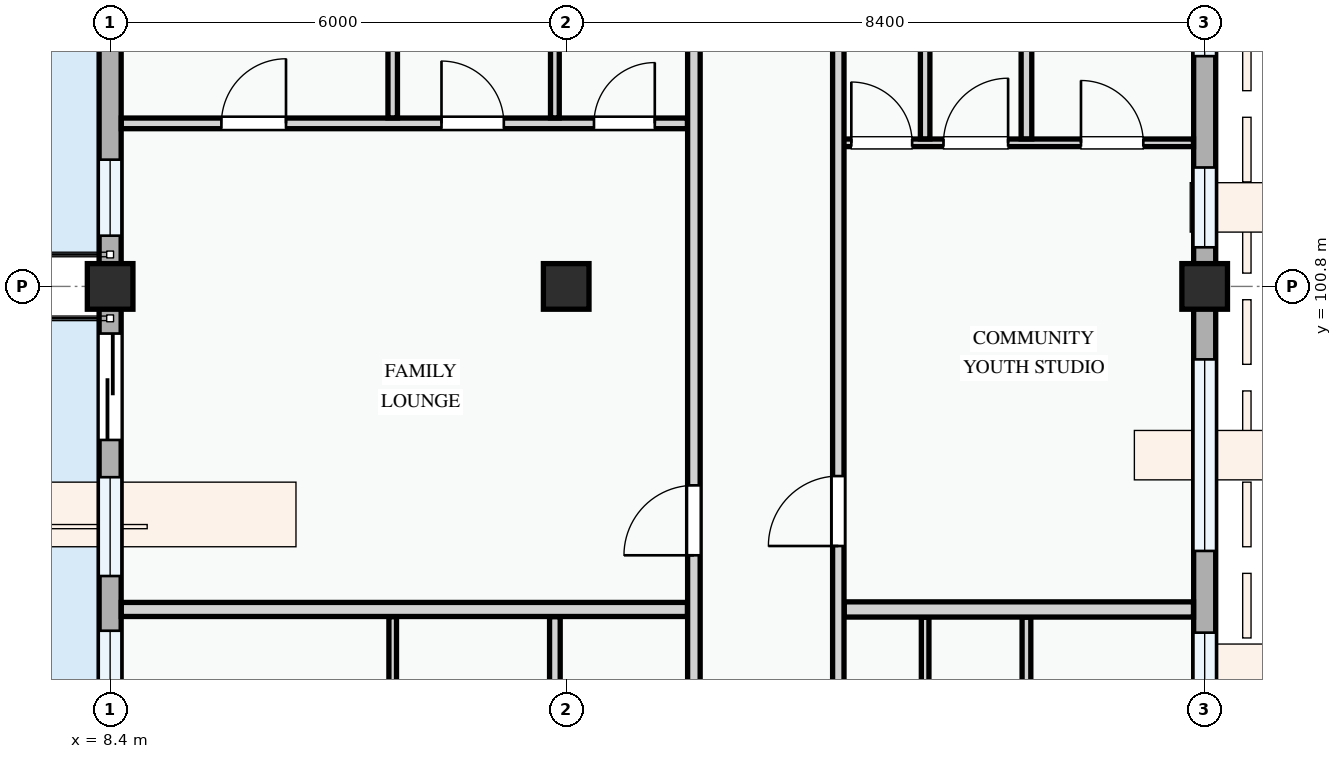
"""IFC4 building model, lengths in metres.
Left out: names, types, materials, properties, quantities, classifications, styles, units other than length and angle.
Written with IfcOpenShell. Run it as: python <this file> out.ifc"""

import sys

from ifc_helpers import new_model, si_unit, direction, frame, frame_2d, origin, origin_2d, place, context, subcontext, project, spatial, rectangle, extrude, element, fill, save


model = new_model("IFC4")
c1 = context("Model", 3, precision=1e-05, world=origin(), true_north=direction((0.0, 1.0)))
c2 = subcontext(c1, "Body", "Model", "MODEL_VIEW")
j1 = project(units=[si_unit("LENGTHUNIT", "METRE"), si_unit("PLANEANGLEUNIT", "RADIAN")], contexts=[c1])
p1 = place(None, origin())
s1 = spatial("IfcSite", under=j1, at=p1, CompositionType="ELEMENT")
p2 = place(p1, origin())
s2 = spatial("IfcBuilding", under=s1, at=p2, CompositionType="ELEMENT")
p3 = place(p2, frame((0.0, 0.0, 27.9)))
s3 = spatial("IfcBuildingStorey", under=s2, at=p3, CompositionType="ELEMENT", Elevation=27.9)
for number, where, z_axis, x_axis in (
    (1, (8.4, 100.8, 0.0), (0.0, 0.0, 1.0), (1.0, 0.0, 0.0)),
    (2, (14.4, 100.8, 0.0), (0.0, 0.0, 1.0), (1.0, 0.0, 0.0)),
    (3, (22.8, 100.8, 0.0), (0.0, 0.0, 1.0), (1.0, 0.0, 0.0)),
):
    element("IfcColumn", number, at=place(p3, frame(where, z_axis=z_axis, x_axis=x_axis)), inside=s3, PredefinedType="COLUMN", context=c2, shape_type="SweptSolid", body=[
        extrude(rectangle(XDim=0.6, YDim=0.6, at=origin_2d()), origin(), (0.0, 0.0, 1.0), 3.3),
    ])
p4 = place(p3, frame((8.4, 109.2, 0.0), z_axis=(0.0, 0.0, 1.0), x_axis=(0.0, -1.0, 0.0)))
e4 = element("IfcWall", 4, at=p4, inside=s3, PredefinedType="STANDARD", context=c2, shape_type="SweptSolid", body=[
    extrude(rectangle(XDim=8.4, YDim=0.29, at=frame_2d((4.2, 0.0))), origin(), (0.0, 0.0, 1.0), 2.345),
])
p5 = place(p4, frame((0.62, 0.0, 0.0)))
e5 = element("IfcOpeningElement", 5, at=p5, cuts=e4, PredefinedType="OPENING", context=c2, shape_type="SweptSolid", body=[
    extrude(rectangle(XDim=1.3, YDim=2.15, at=frame_2d((0.65, 1.075))), frame((0.0, 0.155, 0.0), z_axis=(0.0, -1.0, 0.0), x_axis=(1.0, 0.0, 0.0)), (0.0, 0.0, 1.0), 0.31),
])
p6 = place(p4, frame((3.587, 0.0, 0.78)))
e6 = element("IfcOpeningElement", 6, at=p6, cuts=e4, PredefinedType="OPENING", context=c2, shape_type="SweptSolid", body=[
    extrude(rectangle(XDim=1.05, YDim=1.2, at=frame_2d((0.525, 0.6))), frame((0.0, 0.155, 0.0), z_axis=(0.0, -1.0, 0.0), x_axis=(1.0, 0.0, 0.0)), (0.0, 0.0, 1.0), 0.31),
])
p7 = place(p4, frame((6.732, 0.0, 0.78)))
e7 = element("IfcOpeningElement", 7, at=p7, cuts=e4, PredefinedType="OPENING", context=c2, shape_type="SweptSolid", body=[
    extrude(rectangle(XDim=1.0, YDim=1.25, at=frame_2d((0.5, 0.625))), frame((0.0, 0.155, 0.0), z_axis=(0.0, -1.0, 0.0), x_axis=(1.0, 0.0, 0.0)), (0.0, 0.0, 1.0), 0.31),
])
p8 = place(p3, frame((8.4, 100.8, 0.0), z_axis=(0.0, 0.0, 1.0), x_axis=(0.0, -1.0, 0.0)))
e8 = element("IfcWall", 8, at=p8, inside=s3, PredefinedType="STANDARD", context=c2, shape_type="SweptSolid", body=[
    extrude(rectangle(XDim=6.0, YDim=0.29, at=frame_2d((3.0, 0.0))), origin(), (0.0, 0.0, 1.0), 2.445),
])
p9 = place(p8, frame((0.62, 0.0, 0.0)))
e9 = element("IfcOpeningElement", 9, at=p9, cuts=e8, PredefinedType="OPENING", context=c2, shape_type="SweptSolid", body=[
    extrude(rectangle(XDim=1.4, YDim=2.2, at=frame_2d((0.7, 1.1))), frame((0.0, 0.155, 0.0), z_axis=(0.0, -1.0, 0.0), x_axis=(1.0, 0.0, 0.0)), (0.0, 0.0, 1.0), 0.31),
])
p10 = place(p8, frame((2.51, 0.0, 0.78)))
e10 = element("IfcOpeningElement", 10, at=p10, cuts=e8, PredefinedType="OPENING", context=c2, shape_type="SweptSolid", body=[
    extrude(rectangle(XDim=1.3, YDim=1.4, at=frame_2d((0.65, 0.7))), frame((0.0, 0.155, 0.0), z_axis=(0.0, -1.0, 0.0), x_axis=(1.0, 0.0, 0.0)), (0.0, 0.0, 1.0), 0.31),
])
p11 = place(p8, frame((4.53, 0.0, 0.78)))
e11 = element("IfcOpeningElement", 11, at=p11, cuts=e8, PredefinedType="OPENING", context=c2, shape_type="SweptSolid", body=[
    extrude(rectangle(XDim=1.0, YDim=1.25, at=frame_2d((0.5, 0.625))), frame((0.0, 0.155, 0.0), z_axis=(0.0, -1.0, 0.0), x_axis=(1.0, 0.0, 0.0)), (0.0, 0.0, 1.0), 0.31),
])
p12 = place(p3, frame((22.8, 94.8, 0.0), z_axis=(0.0, 0.0, 1.0), x_axis=(0.0, 1.0, 0.0)))
e12 = element("IfcWall", 12, at=p12, inside=s3, PredefinedType="STANDARD", context=c2, shape_type="SweptSolid", body=[
    extrude(rectangle(XDim=6.0, YDim=0.29, at=frame_2d((3.0, 0.0))), origin(), (0.0, 0.0, 1.0), 2.575),
])
p13 = place(p12, frame((0.495, 0.0, 0.78)))
e13 = element("IfcOpeningElement", 13, at=p13, cuts=e12, PredefinedType="OPENING", context=c2, shape_type="SweptSolid", body=[
    extrude(rectangle(XDim=0.95, YDim=1.15, at=frame_2d((0.475, 0.575))), frame((0.0, 0.155, 0.0), z_axis=(0.0, -1.0, 0.0), x_axis=(1.0, 0.0, 0.0)), (0.0, 0.0, 1.0), 0.31),
])
p14 = place(p12, frame((2.52, 0.0, 0.78)))
e14 = element("IfcOpeningElement", 14, at=p14, cuts=e12, PredefinedType="OPENING", context=c2, shape_type="SweptSolid", body=[
    extrude(rectangle(XDim=2.52, YDim=1.5, at=frame_2d((1.26, 0.75))), frame((0.0, 0.155, 0.0), z_axis=(0.0, -1.0, 0.0), x_axis=(1.0, 0.0, 0.0)), (0.0, 0.0, 1.0), 0.31),
])
p15 = place(p3, frame((22.8, 100.8, 0.0), z_axis=(0.0, 0.0, 1.0), x_axis=(0.0, 1.0, 0.0)))
e15 = element("IfcWall", 15, at=p15, inside=s3, PredefinedType="STANDARD", context=c2, shape_type="SweptSolid", body=[
    extrude(rectangle(XDim=8.4, YDim=0.29, at=frame_2d((4.2, 0.0))), origin(), (0.0, 0.0, 1.0), 2.425),
])
p16 = place(p15, frame((0.515, 0.0, 0.78)))
e16 = element("IfcOpeningElement", 16, at=p16, cuts=e15, PredefinedType="OPENING", context=c2, shape_type="SweptSolid", body=[
    extrude(rectangle(XDim=1.05, YDim=1.2, at=frame_2d((0.525, 0.6))), frame((0.0, 0.155, 0.0), z_axis=(0.0, -1.0, 0.0), x_axis=(1.0, 0.0, 0.0)), (0.0, 0.0, 1.0), 0.31),
])
p17 = place(p15, frame((3.029, 0.0, 0.78)))
e17 = element("IfcOpeningElement", 17, at=p17, cuts=e15, PredefinedType="OPENING", context=c2, shape_type="SweptSolid", body=[
    extrude(rectangle(XDim=0.95, YDim=1.15, at=frame_2d((0.475, 0.575))), frame((0.0, 0.155, 0.0), z_axis=(0.0, -1.0, 0.0), x_axis=(1.0, 0.0, 0.0)), (0.0, 0.0, 1.0), 0.31),
])
p18 = place(p15, frame((5.885, 0.0, 0.78)))
e18 = element("IfcOpeningElement", 18, at=p18, cuts=e15, PredefinedType="OPENING", context=c2, shape_type="SweptSolid", body=[
    extrude(rectangle(XDim=1.42, YDim=1.38, at=frame_2d((0.71, 0.69))), frame((0.0, 0.155, 0.0), z_axis=(0.0, -1.0, 0.0), x_axis=(1.0, 0.0, 0.0)), (0.0, 0.0, 1.0), 0.31),
])
p19 = place(p3, frame((12.118, 91.564, 0.0), z_axis=(0.0, 0.0, 1.0), x_axis=(0.0, 1.0, 0.0)))
e19 = element("IfcWall", 19, at=p19, inside=s3, PredefinedType="PARTITIONING", context=c2, shape_type="SweptSolid", body=[
    extrude(rectangle(XDim=4.891, YDim=0.1, at=frame_2d((2.446, 0.0))), origin(), (0.0, 0.0, 1.0), 3.0),
])
p20 = place(p3, frame((14.251, 91.564, 0.0), z_axis=(0.0, 0.0, 1.0), x_axis=(0.0, 1.0, 0.0)))
e20 = element("IfcWall", 20, at=p20, inside=s3, PredefinedType="PARTITIONING", context=c2, shape_type="SweptSolid", body=[
    extrude(rectangle(XDim=4.891, YDim=0.14, at=frame_2d((2.446, 0.0))), origin(), (0.0, 0.0, 1.0), 2.425),
])
p21 = place(p3, frame((20.455, 91.368, 0.0), z_axis=(0.0, 0.0, 1.0), x_axis=(0.0, 1.0, 0.0)))
e21 = element("IfcWall", 21, at=p21, inside=s3, PredefinedType="PARTITIONING", context=c2, shape_type="SweptSolid", body=[
    extrude(rectangle(XDim=5.08, YDim=0.115, at=frame_2d((2.54, 0.0))), origin(), (0.0, 0.0, 1.0), 3.0),
])
p22 = place(p3, frame((19.122, 91.368, 0.0), z_axis=(0.0, 0.0, 1.0), x_axis=(0.0, 1.0, 0.0)))
e22 = element("IfcWall", 22, at=p22, inside=s3, PredefinedType="PARTITIONING", context=c2, shape_type="SweptSolid", body=[
    extrude(rectangle(XDim=5.08, YDim=0.1, at=frame_2d((2.54, 0.0))), origin(), (0.0, 0.0, 1.0), 3.0),
])
p23 = place(p3, frame((8.547, 102.945, 0.0), z_axis=(0.0, 0.0, 1.0), x_axis=(1.0, 0.0, 0.0)))
e23 = element("IfcWall", 23, at=p23, inside=s3, PredefinedType="PARTITIONING", context=c2, shape_type="SweptSolid", body=[
    extrude(rectangle(XDim=7.448, YDim=0.14, at=frame_2d((3.724, 0.0))), origin(), (0.0, 0.0, 1.0), 3.0),
])
p24 = place(p23, frame((1.317, 0.0, 0.0)))
e24 = element("IfcOpeningElement", 24, at=p24, cuts=e23, PredefinedType="OPENING", context=c2, shape_type="SweptSolid", body=[
    extrude(rectangle(XDim=0.85, YDim=2.1, at=frame_2d((0.425, 1.05))), frame((0.0, 0.08, 0.0), z_axis=(0.0, -1.0, 0.0), x_axis=(1.0, 0.0, 0.0)), (0.0, 0.0, 1.0), 0.16),
])
p25 = place(p23, frame((4.212, 0.0, 0.0)))
e25 = element("IfcOpeningElement", 25, at=p25, cuts=e23, PredefinedType="OPENING", context=c2, shape_type="SweptSolid", body=[
    extrude(rectangle(XDim=0.82, YDim=2.08, at=frame_2d((0.41, 1.04))), frame((0.0, 0.08, 0.0), z_axis=(0.0, -1.0, 0.0), x_axis=(1.0, 0.0, 0.0)), (0.0, 0.0, 1.0), 0.16),
])
p26 = place(p23, frame((6.219, 0.0, 0.0)))
e26 = element("IfcOpeningElement", 26, at=p26, cuts=e23, PredefinedType="OPENING", context=c2, shape_type="SweptSolid", body=[
    extrude(rectangle(XDim=0.8, YDim=2.1, at=frame_2d((0.4, 1.05))), frame((0.0, 0.08, 0.0), z_axis=(0.0, -1.0, 0.0), x_axis=(1.0, 0.0, 0.0)), (0.0, 0.0, 1.0), 0.16),
])
p27 = place(p3, frame((12.118, 103.017, 0.0), z_axis=(0.0, 0.0, 1.0), x_axis=(0.0, 1.0, 0.0)))
e27 = element("IfcWall", 27, at=p27, inside=s3, PredefinedType="PARTITIONING", context=c2, shape_type="SweptSolid", body=[
    extrude(rectangle(XDim=6.211, YDim=0.125, at=frame_2d((3.105, 0.0))), origin(), (0.0, 0.0, 1.0), 3.0),
])
p28 = place(p3, frame((14.251, 103.017, 0.0), z_axis=(0.0, 0.0, 1.0), x_axis=(0.0, 1.0, 0.0)))
e28 = element("IfcWall", 28, at=p28, inside=s3, PredefinedType="PARTITIONING", context=c2, shape_type="SweptSolid", body=[
    extrude(rectangle(XDim=6.211, YDim=0.115, at=frame_2d((3.105, 0.0))), origin(), (0.0, 0.0, 1.0), 2.425),
])
p29 = place(p3, frame((17.98, 102.689, 0.0), z_axis=(0.0, 0.0, 1.0), x_axis=(1.0, 0.0, 0.0)))
e29 = element("IfcWall", 29, at=p29, inside=s3, PredefinedType="PARTITIONING", context=c2, shape_type="SweptSolid", body=[
    extrude(rectangle(XDim=4.673, YDim=0.1, at=frame_2d((2.336, 0.0))), origin(), (0.0, 0.0, 1.0), 3.0),
])
p30 = place(p29, frame((0.171, 0.0, 0.0)))
e30 = element("IfcOpeningElement", 30, at=p30, cuts=e29, PredefinedType="OPENING", context=c2, shape_type="SweptSolid", body=[
    extrude(rectangle(XDim=0.8, YDim=2.1, at=frame_2d((0.4, 1.05))), frame((0.0, 0.06, 0.0), z_axis=(0.0, -1.0, 0.0), x_axis=(1.0, 0.0, 0.0)), (0.0, 0.0, 1.0), 0.12),
])
p31 = place(p29, frame((1.384, 0.0, 0.0)))
e31 = element("IfcOpeningElement", 31, at=p31, cuts=e29, PredefinedType="OPENING", context=c2, shape_type="SweptSolid", body=[
    extrude(rectangle(XDim=0.85, YDim=2.1, at=frame_2d((0.425, 1.05))), frame((0.0, 0.06, 0.0), z_axis=(0.0, -1.0, 0.0), x_axis=(1.0, 0.0, 0.0)), (0.0, 0.0, 1.0), 0.12),
])
p32 = place(p29, frame((3.193, 0.0, 0.0)))
e32 = element("IfcOpeningElement", 32, at=p32, cuts=e29, PredefinedType="OPENING", context=c2, shape_type="SweptSolid", body=[
    extrude(rectangle(XDim=0.82, YDim=2.08, at=frame_2d((0.41, 1.04))), frame((0.0, 0.06, 0.0), z_axis=(0.0, -1.0, 0.0), x_axis=(1.0, 0.0, 0.0)), (0.0, 0.0, 1.0), 0.12),
])
p33 = place(p3, frame((20.455, 102.741, 0.0), z_axis=(0.0, 0.0, 1.0), x_axis=(0.0, 1.0, 0.0)))
e33 = element("IfcWall", 33, at=p33, inside=s3, PredefinedType="PARTITIONING", context=c2, shape_type="SweptSolid", body=[
    extrude(rectangle(XDim=6.504, YDim=0.14, at=frame_2d((3.252, 0.0))), origin(), (0.0, 0.0, 1.0), 3.0),
])
p34 = place(p3, frame((19.122, 102.741, 0.0), z_axis=(0.0, 0.0, 1.0), x_axis=(0.0, 1.0, 0.0)))
e34 = element("IfcWall", 34, at=p34, inside=s3, PredefinedType="PARTITIONING", context=c2, shape_type="SweptSolid", body=[
    extrude(rectangle(XDim=6.504, YDim=0.125, at=frame_2d((3.252, 0.0))), origin(), (0.0, 0.0, 1.0), 3.0),
])
p35 = place(p3, frame((8.547, 96.55, 0.0), z_axis=(0.0, 0.0, 1.0), x_axis=(1.0, 0.0, 0.0)))
e35 = element("IfcWall", 35, at=p35, inside=s3, PredefinedType="PARTITIONING", context=c2, shape_type="SweptSolid", body=[
    extrude(rectangle(XDim=7.448, YDim=0.185, at=frame_2d((3.724, 0.0))), origin(), (0.0, 0.0, 1.0), 3.0),
])
p36 = place(p3, frame((18.057, 96.55, 0.0), z_axis=(0.0, 0.0, 1.0), x_axis=(1.0, 0.0, 0.0)))
e36 = element("IfcWall", 36, at=p36, inside=s3, PredefinedType="PARTITIONING", context=c2, shape_type="SweptSolid", body=[
    extrude(rectangle(XDim=4.596, YDim=0.2, at=frame_2d((2.298, 0.0))), origin(), (0.0, 0.0, 1.0), 3.0),
])
p37 = place(p3, frame((16.08, 86.547, 0.0), z_axis=(0.0, 0.0, 1.0), x_axis=(0.0, 1.0, 0.0)))
e37 = element("IfcWall", 37, at=p37, inside=s3, PredefinedType="PARTITIONING", context=c2, shape_type="SweptSolid", body=[
    extrude(rectangle(XDim=22.793, YDim=0.165, at=frame_2d((11.396, 0.0))), origin(), (0.0, 0.0, 1.0), 3.0),
])
p38 = place(p37, frame((3.524, 0.0, 0.0)))
e38 = element("IfcOpeningElement", 38, at=p38, cuts=e37, PredefinedType="OPENING", context=c2, shape_type="SweptSolid", body=[
    extrude(rectangle(XDim=0.92, YDim=2.1, at=frame_2d((0.46, 1.05))), frame((0.0, 0.093, 0.0), z_axis=(0.0, -1.0, 0.0), x_axis=(1.0, 0.0, 0.0)), (0.0, 0.0, 1.0), 0.185),
])
p39 = place(p37, frame((10.716, 0.0, 0.0)))
e39 = element("IfcOpeningElement", 39, at=p39, cuts=e37, PredefinedType="OPENING", context=c2, shape_type="SweptSolid", body=[
    extrude(rectangle(XDim=0.92, YDim=2.1, at=frame_2d((0.46, 1.05))), frame((0.0, 0.093, 0.0), z_axis=(0.0, -1.0, 0.0), x_axis=(1.0, 0.0, 0.0)), (0.0, 0.0, 1.0), 0.185),
])
p40 = place(p3, frame((17.98, 86.547, 0.0), z_axis=(0.0, 0.0, 1.0), x_axis=(0.0, 1.0, 0.0)))
e40 = element("IfcWall", 40, at=p40, inside=s3, PredefinedType="PARTITIONING", context=c2, shape_type="SweptSolid", body=[
    extrude(rectangle(XDim=22.793, YDim=0.15, at=frame_2d((11.396, 0.0))), origin(), (0.0, 0.0, 1.0), 3.0),
])
p41 = place(p40, frame((3.546, 0.0, 0.0)))
e41 = element("IfcOpeningElement", 41, at=p41, cuts=e40, PredefinedType="OPENING", context=c2, shape_type="SweptSolid", body=[
    extrude(rectangle(XDim=0.92, YDim=2.1, at=frame_2d((0.46, 1.05))), frame((0.0, 0.085, 0.0), z_axis=(0.0, -1.0, 0.0), x_axis=(1.0, 0.0, 0.0)), (0.0, 0.0, 1.0), 0.17),
])
p42 = place(p40, frame((10.838, 0.0, 0.0)))
e42 = element("IfcOpeningElement", 42, at=p42, cuts=e40, PredefinedType="OPENING", context=c2, shape_type="SweptSolid", body=[
    extrude(rectangle(XDim=0.92, YDim=2.1, at=frame_2d((0.46, 1.05))), frame((0.0, 0.085, 0.0), z_axis=(0.0, -1.0, 0.0), x_axis=(1.0, 0.0, 0.0)), (0.0, 0.0, 1.0), 0.17),
])
p43 = place(p7, origin())
e43 = element("IfcWindow", 43, at=p43, inside=s3, PartitioningType="SINGLE_PANEL", PredefinedType="WINDOW", context=c2, shape_type="SweptSolid", body=[
    extrude(rectangle(XDim=1.0, YDim=1.25, at=frame_2d((0.5, 0.625))), frame((0.0, 0.03, 0.0), z_axis=(0.0, -1.0, 0.0), x_axis=(1.0, 0.0, 0.0)), (0.0, 0.0, 1.0), 0.06),
])
fill(e7, e43)
p44 = place(p9, frame((1.4, 0.0, 0.0), z_axis=(0.0, 0.0, 1.0), x_axis=(-1.0, 0.0, 0.0)))
e44 = element("IfcDoor", 44, at=p44, inside=s3, OperationType="SLIDING_TO_LEFT", PredefinedType="DOOR", context=c2, shape_type="SweptSolid", body=[
    extrude(rectangle(XDim=1.4, YDim=2.2, at=frame_2d((0.7, 1.1))), frame((0.0, 0.025, 0.0), z_axis=(0.0, -1.0, 0.0), x_axis=(1.0, 0.0, 0.0)), (0.0, 0.0, 1.0), 0.05),
])
fill(e9, e44)
p45 = place(p10, origin())
e45 = element("IfcWindow", 45, at=p45, inside=s3, PartitioningType="SINGLE_PANEL", PredefinedType="WINDOW", context=c2, shape_type="SweptSolid", body=[
    extrude(rectangle(XDim=1.3, YDim=1.4, at=frame_2d((0.65, 0.7))), frame((0.0, 0.03, 0.0), z_axis=(0.0, -1.0, 0.0), x_axis=(1.0, 0.0, 0.0)), (0.0, 0.0, 1.0), 0.06),
])
fill(e10, e45)
p46 = place(p11, origin())
e46 = element("IfcWindow", 46, at=p46, inside=s3, PartitioningType="SINGLE_PANEL", PredefinedType="WINDOW", context=c2, shape_type="SweptSolid", body=[
    extrude(rectangle(XDim=1.0, YDim=1.25, at=frame_2d((0.5, 0.625))), frame((0.0, 0.03, 0.0), z_axis=(0.0, -1.0, 0.0), x_axis=(1.0, 0.0, 0.0)), (0.0, 0.0, 1.0), 0.06),
])
fill(e11, e46)
p47 = place(p13, origin())
e47 = element("IfcWindow", 47, at=p47, inside=s3, PartitioningType="SINGLE_PANEL", PredefinedType="WINDOW", context=c2, shape_type="SweptSolid", body=[
    extrude(rectangle(XDim=0.95, YDim=1.15, at=frame_2d((0.475, 0.575))), frame((0.0, 0.03, 0.0), z_axis=(0.0, -1.0, 0.0), x_axis=(1.0, 0.0, 0.0)), (0.0, 0.0, 1.0), 0.06),
])
fill(e13, e47)
p48 = place(p14, origin())
e48 = element("IfcWindow", 48, at=p48, inside=s3, PartitioningType="DOUBLE_PANEL_VERTICAL", PredefinedType="WINDOW", context=c2, shape_type="SweptSolid", body=[
    extrude(rectangle(XDim=2.52, YDim=1.5, at=frame_2d((1.26, 0.75))), frame((0.0, 0.03, 0.0), z_axis=(0.0, -1.0, 0.0), x_axis=(1.0, 0.0, 0.0)), (0.0, 0.0, 1.0), 0.06),
])
fill(e14, e48)
p49 = place(p16, origin())
e49 = element("IfcWindow", 49, at=p49, inside=s3, PartitioningType="SINGLE_PANEL", PredefinedType="WINDOW", context=c2, shape_type="SweptSolid", body=[
    extrude(rectangle(XDim=1.05, YDim=1.2, at=frame_2d((0.525, 0.6))), frame((0.0, 0.03, 0.0), z_axis=(0.0, -1.0, 0.0), x_axis=(1.0, 0.0, 0.0)), (0.0, 0.0, 1.0), 0.06),
])
fill(e16, e49)
p50 = place(p17, origin())
e50 = element("IfcWindow", 50, at=p50, inside=s3, PartitioningType="SINGLE_PANEL", PredefinedType="WINDOW", context=c2, shape_type="SweptSolid", body=[
    extrude(rectangle(XDim=0.95, YDim=1.15, at=frame_2d((0.475, 0.575))), frame((0.0, 0.03, 0.0), z_axis=(0.0, -1.0, 0.0), x_axis=(1.0, 0.0, 0.0)), (0.0, 0.0, 1.0), 0.06),
])
fill(e17, e50)
p51 = place(p24, origin())
e51 = element("IfcDoor", 51, at=p51, inside=s3, OperationType="SINGLE_SWING_RIGHT", PredefinedType="DOOR", context=c2, shape_type="SweptSolid", body=[
    extrude(rectangle(XDim=0.85, YDim=2.1, at=frame_2d((0.425, 1.05))), frame((0.0, 0.025, 0.0), z_axis=(0.0, -1.0, 0.0), x_axis=(1.0, 0.0, 0.0)), (0.0, 0.0, 1.0), 0.05),
])
fill(e24, e51)
p52 = place(p25, origin())
e52 = element("IfcDoor", 52, at=p52, inside=s3, OperationType="SINGLE_SWING_LEFT", PredefinedType="DOOR", context=c2, shape_type="SweptSolid", body=[
    extrude(rectangle(XDim=0.82, YDim=2.08, at=frame_2d((0.41, 1.04))), frame((0.0, 0.025, 0.0), z_axis=(0.0, -1.0, 0.0), x_axis=(1.0, 0.0, 0.0)), (0.0, 0.0, 1.0), 0.05),
])
fill(e25, e52)
p53 = place(p26, origin())
e53 = element("IfcDoor", 53, at=p53, inside=s3, OperationType="SINGLE_SWING_RIGHT", PredefinedType="DOOR", context=c2, shape_type="SweptSolid", body=[
    extrude(rectangle(XDim=0.8, YDim=2.1, at=frame_2d((0.4, 1.05))), frame((0.0, 0.025, 0.0), z_axis=(0.0, -1.0, 0.0), x_axis=(1.0, 0.0, 0.0)), (0.0, 0.0, 1.0), 0.05),
])
fill(e26, e53)
p54 = place(p30, origin())
e54 = element("IfcDoor", 54, at=p54, inside=s3, OperationType="SINGLE_SWING_LEFT", PredefinedType="DOOR", context=c2, shape_type="SweptSolid", body=[
    extrude(rectangle(XDim=0.8, YDim=2.1, at=frame_2d((0.4, 1.05))), frame((0.0, 0.025, 0.0), z_axis=(0.0, -1.0, 0.0), x_axis=(1.0, 0.0, 0.0)), (0.0, 0.0, 1.0), 0.05),
])
fill(e30, e54)
p55 = place(p31, origin())
e55 = element("IfcDoor", 55, at=p55, inside=s3, OperationType="SINGLE_SWING_RIGHT", PredefinedType="DOOR", context=c2, shape_type="SweptSolid", body=[
    extrude(rectangle(XDim=0.85, YDim=2.1, at=frame_2d((0.425, 1.05))), frame((0.0, 0.025, 0.0), z_axis=(0.0, -1.0, 0.0), x_axis=(1.0, 0.0, 0.0)), (0.0, 0.0, 1.0), 0.05),
])
fill(e31, e55)
p56 = place(p32, origin())
e56 = element("IfcDoor", 56, at=p56, inside=s3, OperationType="SINGLE_SWING_LEFT", PredefinedType="DOOR", context=c2, shape_type="SweptSolid", body=[
    extrude(rectangle(XDim=0.82, YDim=2.08, at=frame_2d((0.41, 1.04))), frame((0.0, 0.025, 0.0), z_axis=(0.0, -1.0, 0.0), x_axis=(1.0, 0.0, 0.0)), (0.0, 0.0, 1.0), 0.05),
])
fill(e32, e56)
p57 = place(p39, origin())
e57 = element("IfcDoor", 57, at=p57, inside=s3, OperationType="SINGLE_SWING_LEFT", PredefinedType="DOOR", context=c2, shape_type="SweptSolid", body=[
    extrude(rectangle(XDim=0.92, YDim=2.1, at=frame_2d((0.46, 1.05))), frame((0.0, 0.025, 0.0), z_axis=(0.0, -1.0, 0.0), x_axis=(1.0, 0.0, 0.0)), (0.0, 0.0, 1.0), 0.05),
])
fill(e39, e57)
p58 = place(p42, origin())
e58 = element("IfcDoor", 58, at=p58, inside=s3, OperationType="SINGLE_SWING_LEFT", PredefinedType="DOOR", context=c2, shape_type="SweptSolid", body=[
    extrude(rectangle(XDim=0.92, YDim=2.1, at=frame_2d((0.46, 1.05))), frame((0.0, 0.025, 0.0), z_axis=(0.0, -1.0, 0.0), x_axis=(1.0, 0.0, 0.0)), (0.0, 0.0, 1.0), 0.05),
])
fill(e42, e58)
save(model, sys.argv[1])
